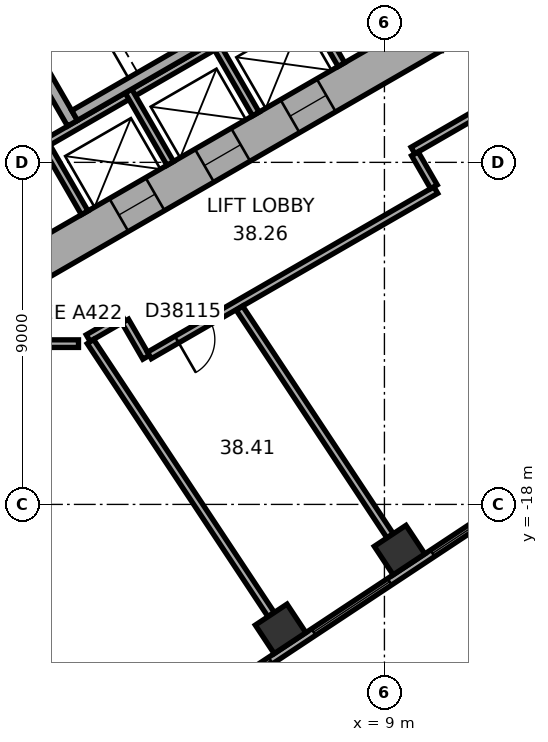
"""IFC4 building model, lengths in metres.
Left out: names, types, materials, properties, quantities, classifications, styles, units other than length and angle.
Written with IfcOpenShell. Run it as: python <this file> out.ifc"""

import sys

from ifc_helpers import new_model, si_unit, direction, frame, frame_2d, origin, origin_2d, place, context, subcontext, project, spatial, rectangle, extrude, element, fill, save


model = new_model("IFC4")
c1 = context("Model", 3, precision=1e-05, world=origin(), true_north=direction((0.0, 1.0)))
c2 = subcontext(c1, "Body", "Model", "MODEL_VIEW")
j1 = project(units=[si_unit("LENGTHUNIT", "METRE"), si_unit("PLANEANGLEUNIT", "RADIAN")], contexts=[c1])
p1 = place(None, origin())
s1 = spatial("IfcSite", under=j1, at=p1, CompositionType="ELEMENT")
p2 = place(p1, origin())
s2 = spatial("IfcBuilding", under=s1, at=p2, CompositionType="ELEMENT")
p3 = place(p2, frame((0.0, 0.0, 157.7)))
s3 = spatial("IfcBuildingStorey", under=s2, at=p3, CompositionType="ELEMENT", Elevation=157.7)
for number, where, z_axis, x_axis in (
    (1, (6.268, -21.274, 0.0), (0.0, 0.0, 1.0), (0.834, 0.552, 0.0)),
    (2, (9.398, -19.202, 0.0), (0.0, 0.0, 1.0), (0.834, 0.552, 0.0)),
):
    element("IfcColumn", number, at=place(p3, frame(where, z_axis=z_axis, x_axis=x_axis)), inside=s3, PredefinedType="COLUMN", context=c2, shape_type="SweptSolid", body=[
        extrude(rectangle(XDim=1.0, YDim=0.9, at=origin_2d()), origin(), (0.0, 0.0, 1.0), 3.7),
    ])
p4 = place(p3, frame((-10.25, -5.629, 0.0), z_axis=(0.0, 0.0, 1.0), x_axis=(0.866022616891, -0.50000482701, 0.0)))
e3 = element("IfcWall", 3, at=p4, inside=s3, PredefinedType="SHEAR", context=c2, shape_type="SweptSolid", body=[
    extrude(rectangle(XDim=12.125, YDim=1.0, at=frame_2d((6.062, 0.0))), origin(), (0.0, 0.0, 1.0), 3.7),
])
p5 = place(p4, frame((6.262, 0.0, 0.0)))
e4 = element("IfcOpeningElement", 4, at=p5, cuts=e3, PredefinedType="OPENING", context=c2, shape_type="SweptSolid", body=[
    extrude(rectangle(XDim=1.5, YDim=2.1, at=frame_2d((0.75, 1.05))), frame((0.0, 0.51, 0.0), z_axis=(0.0, -1.0, 0.0), x_axis=(1.0, 0.0, 0.0)), (0.0, 0.0, 1.0), 1.02),
])
p6 = place(p4, frame((1.712, 0.0, 0.0)))
e5 = element("IfcOpeningElement", 5, at=p6, cuts=e3, PredefinedType="OPENING", context=c2, shape_type="SweptSolid", body=[
    extrude(rectangle(XDim=1.1, YDim=2.1, at=frame_2d((0.55, 1.05))), frame((0.0, 0.51, 0.0), z_axis=(0.0, -1.0, 0.0), x_axis=(1.0, 0.0, 0.0)), (0.0, 0.0, 1.0), 1.02),
])
p7 = place(p4, frame((4.312, 0.0, 0.0)))
e6 = element("IfcOpeningElement", 6, at=p7, cuts=e3, PredefinedType="OPENING", context=c2, shape_type="SweptSolid", body=[
    extrude(rectangle(XDim=1.1, YDim=2.1, at=frame_2d((0.55, 1.05))), frame((0.0, 0.51, 0.0), z_axis=(0.0, -1.0, 0.0), x_axis=(1.0, 0.0, 0.0)), (0.0, 0.0, 1.0), 1.02),
])
p8 = place(p3, frame((-0.25, -11.691, 0.0), z_axis=(0.0, 0.0, 1.0), x_axis=(0.866022616891, 0.50000482701, 0.0)))
e7 = element("IfcWall", 7, at=p8, inside=s3, PredefinedType="SHEAR", context=c2, shape_type="SweptSolid", body=[
    extrude(rectangle(XDim=12.125, YDim=1.0, at=frame_2d((6.062, 0.0))), origin(), (0.0, 0.0, 1.0), 3.7),
])
p9 = place(p8, frame((2.612, 0.0, 0.0)))
e8 = element("IfcOpeningElement", 8, at=p9, cuts=e7, PredefinedType="OPENING", context=c2, shape_type="SweptSolid", body=[
    extrude(rectangle(XDim=1.1, YDim=2.1, at=frame_2d((0.55, 1.05))), frame((0.0, 0.51, 0.0), z_axis=(0.0, -1.0, 0.0), x_axis=(1.0, 0.0, 0.0)), (0.0, 0.0, 1.0), 1.02),
])
p10 = place(p8, frame((5.212, 0.0, 0.0)))
e9 = element("IfcOpeningElement", 9, at=p10, cuts=e7, PredefinedType="OPENING", context=c2, shape_type="SweptSolid", body=[
    extrude(rectangle(XDim=1.1, YDim=2.1, at=frame_2d((0.55, 1.05))), frame((0.0, 0.51, 0.0), z_axis=(0.0, -1.0, 0.0), x_axis=(1.0, 0.0, 0.0)), (0.0, 0.0, 1.0), 1.02),
])
p11 = place(p8, frame((7.812, 0.0, 0.0)))
e10 = element("IfcOpeningElement", 10, at=p11, cuts=e7, PredefinedType="OPENING", context=c2, shape_type="SweptSolid", body=[
    extrude(rectangle(XDim=1.1, YDim=2.1, at=frame_2d((0.55, 1.05))), frame((0.0, 0.51, 0.0), z_axis=(0.0, -1.0, 0.0), x_axis=(1.0, 0.0, 0.0)), (0.0, 0.0, 1.0), 1.02),
])
p12 = place(p3, frame((2.911, -24.156, 0.0), z_axis=(0.0, 0.0, 1.0), x_axis=(0.833882163564, 0.551942512668, 0.0)))
e11 = element("IfcWall", 11, at=p12, inside=s3, PredefinedType="STANDARD", context=c2, shape_type="SweptSolid", body=[
    extrude(rectangle(XDim=20.044, YDim=0.2, at=frame_2d((10.022, 0.0))), origin(), (0.0, 0.0, 1.0), 3.7),
])
p13 = place(p12, frame((1.313, 0.0, 0.9)))
e12 = element("IfcOpeningElement", 12, at=p13, cuts=e11, PredefinedType="OPENING", context=c2, shape_type="SweptSolid", body=[
    extrude(rectangle(XDim=2.4, YDim=2.0, at=frame_2d((1.2, 1.0))), frame((0.0, 0.11, 0.0), z_axis=(0.0, -1.0, 0.0), x_axis=(1.0, 0.0, 0.0)), (0.0, 0.0, 1.0), 0.22),
])
p14 = place(p12, frame((5.067, 0.0, 0.9)))
e13 = element("IfcOpeningElement", 13, at=p14, cuts=e11, PredefinedType="OPENING", context=c2, shape_type="SweptSolid", body=[
    extrude(rectangle(XDim=2.4, YDim=2.0, at=frame_2d((1.2, 1.0))), frame((0.0, 0.11, 0.0), z_axis=(0.0, -1.0, 0.0), x_axis=(1.0, 0.0, 0.0)), (0.0, 0.0, 1.0), 0.22),
])
p15 = place(p12, frame((8.821, 0.0, 0.9)))
e14 = element("IfcOpeningElement", 14, at=p15, cuts=e11, PredefinedType="OPENING", context=c2, shape_type="SweptSolid", body=[
    extrude(rectangle(XDim=2.4, YDim=2.0, at=frame_2d((1.2, 1.0))), frame((0.0, 0.11, 0.0), z_axis=(0.0, -1.0, 0.0), x_axis=(1.0, 0.0, 0.0)), (0.0, 0.0, 1.0), 0.22),
])
p16 = place(p12, frame((12.575, 0.0, 0.9)))
e15 = element("IfcOpeningElement", 15, at=p16, cuts=e11, PredefinedType="OPENING", context=c2, shape_type="SweptSolid", body=[
    extrude(rectangle(XDim=2.4, YDim=2.0, at=frame_2d((1.2, 1.0))), frame((0.0, 0.11, 0.0), z_axis=(0.0, -1.0, 0.0), x_axis=(1.0, 0.0, 0.0)), (0.0, 0.0, 1.0), 0.22),
])
p17 = place(p12, frame((16.329, 0.0, 0.9)))
e16 = element("IfcOpeningElement", 16, at=p17, cuts=e11, PredefinedType="OPENING", context=c2, shape_type="SweptSolid", body=[
    extrude(rectangle(XDim=2.4, YDim=2.0, at=frame_2d((1.2, 1.0))), frame((0.0, 0.11, 0.0), z_axis=(0.0, -1.0, 0.0), x_axis=(1.0, 0.0, 0.0)), (0.0, 0.0, 1.0), 0.22),
])
p18 = place(p3, frame((-0.024, -8.559, 0.0), z_axis=(0.0, 0.0, 1.0), x_axis=(0.866026010844, 0.49999894854, 0.0)))
e17 = element("IfcWall", 17, at=p18, inside=s3, PredefinedType="PARTITIONING", context=c2, shape_type="SweptSolid", body=[
    extrude(rectangle(XDim=8.0, YDim=0.2, at=frame_2d((4.0, 0.0))), origin(), (0.0, 0.0, 1.0), 3.42),
])
for number, where, z_axis, x_axis in (
    (18, (0.013, -8.422, 0.0), (0.0, 0.0, 1.0), (0.5, -0.866, 0.0)),
    (19, (2.264, -7.122, 0.0), (0.0, 0.0, 1.0), (0.5, -0.866, 0.0)),
    (20, (4.516, -5.822, 0.0), (0.0, 0.0, 1.0), (0.5, -0.866, 0.0)),
    (21, (6.768, -4.522, 0.0), (0.0, 0.0, 1.0), (0.5, -0.866, 0.0)),
):
    element("IfcWall", number, at=place(p3, frame(where, z_axis=z_axis, x_axis=x_axis)), inside=s3, PredefinedType="PARTITIONING", context=c2, shape_type="SweptSolid", body=[
        extrude(rectangle(XDim=2.2, YDim=0.2, at=frame_2d((1.1, 0.0))), origin(), (0.0, 0.0, 1.0), 3.42),
    ])
p19 = place(p3, frame((-1.558, -3.902, 0.0), z_axis=(0.0, 0.0, 1.0), x_axis=(0.499977259774, -0.866038532462, 0.0)))
e22 = element("IfcWall", 22, at=p19, inside=s3, PredefinedType="SHEAR", context=c2, shape_type="SweptSolid", body=[
    extrude(rectangle(XDim=4.7, YDim=0.3, at=frame_2d((2.35, 0.0))), origin(), (0.0, 0.0, 1.0), 3.42),
])
p20 = place(p19, frame((0.8, 0.0, 0.0)))
e23 = element("IfcOpeningElement", 23, at=p20, cuts=e22, PredefinedType="OPENING", context=c2, shape_type="SweptSolid", body=[
    extrude(rectangle(XDim=1.2, YDim=2.1, at=frame_2d((0.6, 1.05))), frame((0.0, 0.16, 0.0), z_axis=(0.0, -1.0, 0.0), x_axis=(1.0, 0.0, 0.0)), (0.0, 0.0, 1.0), 0.32),
])
p21 = place(p3, frame((0.847, -7.767, 0.0), z_axis=(0.0, 0.0, 1.0), x_axis=(0.866027801685, 0.499995846692, 0.0)))
e24 = element("IfcWall", 24, at=p21, inside=s3, PredefinedType="SHEAR", context=c2, shape_type="SweptSolid", body=[
    extrude(rectangle(XDim=7.06, YDim=0.3, at=frame_2d((3.53, 0.0))), origin(), (0.0, 0.0, 1.0), 3.42),
])
p22 = place(p3, frame((-0.95, -13.77, 0.0), z_axis=(0.0, 0.0, 1.0), x_axis=(1.0, 0.0, 0.0)))
e25 = element("IfcWall", 25, at=p22, inside=s3, PredefinedType="PARTITIONING", context=c2, shape_type="SweptSolid", body=[
    extrude(rectangle(XDim=1.9, YDim=0.2, at=frame_2d((0.95, 0.0))), origin(), (0.0, 0.0, 1.0), 3.42),
])
p23 = place(p3, frame((1.204, -13.623, 0.0), z_axis=(0.0, 0.0, 1.0), x_axis=(0.866040989419, 0.499973003918, 0.0)))
e26 = element("IfcWall", 26, at=p23, inside=s3, PredefinedType="PARTITIONING", context=c2, shape_type="SweptSolid", body=[
    extrude(rectangle(XDim=1.068, YDim=0.2, at=frame_2d((0.534, 0.0))), origin(), (0.0, 0.0, 1.0), 3.42),
])
p24 = place(p3, frame((2.179, -13.176, 0.0), z_axis=(0.0, 0.0, 1.0), x_axis=(0.499978356969, -0.866037899034, 0.0)))
e27 = element("IfcWall", 27, at=p24, inside=s3, PredefinedType="PARTITIONING", context=c2, shape_type="SweptSolid", body=[
    extrude(rectangle(XDim=1.101, YDim=0.2, at=frame_2d((0.551, 0.0))), origin(), (0.0, 0.0, 1.0), 3.42),
])
p25 = place(p3, frame((2.816, -14.079, 0.0), z_axis=(0.0, 0.0, 1.0), x_axis=(0.866021128829, 0.500007404367, 0.0)))
e28 = element("IfcWall", 28, at=p25, inside=s3, PredefinedType="PARTITIONING", context=c2, shape_type="SweptSolid", body=[
    extrude(rectangle(XDim=8.702, YDim=0.2, at=frame_2d((4.351, 0.0))), origin(), (0.0, 0.0, 1.0), 3.42),
])
p26 = place(p25, frame((0.833, 0.0, 0.0)))
e29 = element("IfcOpeningElement", 29, at=p26, cuts=e28, PredefinedType="OPENING", context=c2, shape_type="SweptSolid", body=[
    extrude(rectangle(XDim=1.0, YDim=2.1, at=frame_2d((0.5, 1.05))), frame((0.0, 0.11, 0.0), z_axis=(0.0, -1.0, 0.0), x_axis=(1.0, 0.0, 0.0)), (0.0, 0.0, 1.0), 0.22),
])
p27 = place(p3, frame((6.02, -20.899, 0.0), z_axis=(0.0, 0.0, 1.0), x_axis=(-0.551943990108, 0.833881185651, 0.0)))
e30 = element("IfcWall", 30, at=p27, inside=s3, PredefinedType="PARTITIONING", context=c2, shape_type="SweptSolid", body=[
    extrude(rectangle(XDim=8.615, YDim=0.2, at=frame_2d((4.308, 0.0))), origin(), (0.0, 0.0, 1.0), 3.42),
])
p28 = place(p3, frame((9.15, -18.827, 0.0), z_axis=(0.0, 0.0, 1.0), x_axis=(-0.551928083938, 0.83389171369, 0.0)))
e31 = element("IfcWall", 31, at=p28, inside=s3, PredefinedType="PARTITIONING", context=c2, shape_type="SweptSolid", body=[
    extrude(rectangle(XDim=7.182, YDim=0.2, at=frame_2d((3.591, 0.0))), origin(), (0.0, 0.0, 1.0), 2.87),
])
p29 = place(p3, frame((9.752, -8.688, 0.0), z_axis=(0.0, 0.0, 1.0), x_axis=(0.865974105138, 0.500088841337, 0.0)))
e32 = element("IfcWall", 32, at=p29, inside=s3, PredefinedType="PARTITIONING", context=c2, shape_type="SweptSolid", body=[
    extrude(rectangle(XDim=1.961, YDim=0.2, at=frame_2d((0.98, 0.0))), origin(), (0.0, 0.0, 1.0), 3.42),
])
p30 = place(p3, frame((10.302, -9.642, 0.0), z_axis=(0.0, 0.0, 1.0), x_axis=(-0.500074377092, 0.865982457891, 0.0)))
e33 = element("IfcWall", 33, at=p30, inside=s3, PredefinedType="PARTITIONING", context=c2, shape_type="SweptSolid", body=[
    extrude(rectangle(XDim=1.001, YDim=0.2, at=frame_2d((0.5, 0.0))), origin(), (0.0, 0.0, 1.0), 3.42),
])
p31 = place(p13, origin())
e34 = element("IfcWindow", 34, at=p31, inside=s3, PartitioningType="SINGLE_PANEL", PredefinedType="WINDOW", context=c2, shape_type="SweptSolid", body=[
    extrude(rectangle(XDim=2.4, YDim=2.0, at=frame_2d((1.2, 1.0))), frame((0.0, 0.03, 0.0), z_axis=(0.0, -1.0, 0.0), x_axis=(1.0, 0.0, 0.0)), (0.0, 0.0, 1.0), 0.06),
])
fill(e12, e34)
p32 = place(p14, origin())
e35 = element("IfcWindow", 35, at=p32, inside=s3, PartitioningType="SINGLE_PANEL", PredefinedType="WINDOW", context=c2, shape_type="SweptSolid", body=[
    extrude(rectangle(XDim=2.4, YDim=2.0, at=frame_2d((1.2, 1.0))), frame((0.0, 0.03, 0.0), z_axis=(0.0, -1.0, 0.0), x_axis=(1.0, 0.0, 0.0)), (0.0, 0.0, 1.0), 0.06),
])
fill(e13, e35)
p33 = place(p15, origin())
e36 = element("IfcWindow", 36, at=p33, inside=s3, PartitioningType="SINGLE_PANEL", PredefinedType="WINDOW", context=c2, shape_type="SweptSolid", body=[
    extrude(rectangle(XDim=2.4, YDim=2.0, at=frame_2d((1.2, 1.0))), frame((0.0, 0.03, 0.0), z_axis=(0.0, -1.0, 0.0), x_axis=(1.0, 0.0, 0.0)), (0.0, 0.0, 1.0), 0.06),
])
fill(e14, e36)
p34 = place(p9, origin())
e37 = element("IfcDoor", 37, at=p34, inside=s3, OperationType="DOUBLE_DOOR_SLIDING", PredefinedType="DOOR", context=c2, shape_type="SweptSolid", body=[
    extrude(rectangle(XDim=1.1, YDim=2.1, at=frame_2d((0.55, 1.05))), frame((0.0, 0.025, 0.0), z_axis=(0.0, -1.0, 0.0), x_axis=(1.0, 0.0, 0.0)), (0.0, 0.0, 1.0), 0.05),
])
fill(e8, e37)
p35 = place(p10, origin())
e38 = element("IfcDoor", 38, at=p35, inside=s3, OperationType="DOUBLE_DOOR_SLIDING", PredefinedType="DOOR", context=c2, shape_type="SweptSolid", body=[
    extrude(rectangle(XDim=1.1, YDim=2.1, at=frame_2d((0.55, 1.05))), frame((0.0, 0.025, 0.0), z_axis=(0.0, -1.0, 0.0), x_axis=(1.0, 0.0, 0.0)), (0.0, 0.0, 1.0), 0.05),
])
fill(e9, e38)
p36 = place(p11, origin())
e39 = element("IfcDoor", 39, at=p36, inside=s3, OperationType="DOUBLE_DOOR_SLIDING", PredefinedType="DOOR", context=c2, shape_type="SweptSolid", body=[
    extrude(rectangle(XDim=1.1, YDim=2.1, at=frame_2d((0.55, 1.05))), frame((0.0, 0.025, 0.0), z_axis=(0.0, -1.0, 0.0), x_axis=(1.0, 0.0, 0.0)), (0.0, 0.0, 1.0), 0.05),
])
fill(e10, e39)
p37 = place(p26, origin())
e40 = element("IfcDoor", 40, at=p37, inside=s3, OperationType="SINGLE_SWING_LEFT", PredefinedType="DOOR", context=c2, shape_type="SweptSolid", body=[
    extrude(rectangle(XDim=1.0, YDim=2.1, at=frame_2d((0.5, 1.05))), frame((0.0, 0.025, 0.0), z_axis=(0.0, -1.0, 0.0), x_axis=(1.0, 0.0, 0.0)), (0.0, 0.0, 1.0), 0.05),
])
fill(e29, e40)
save(model, sys.argv[1])
